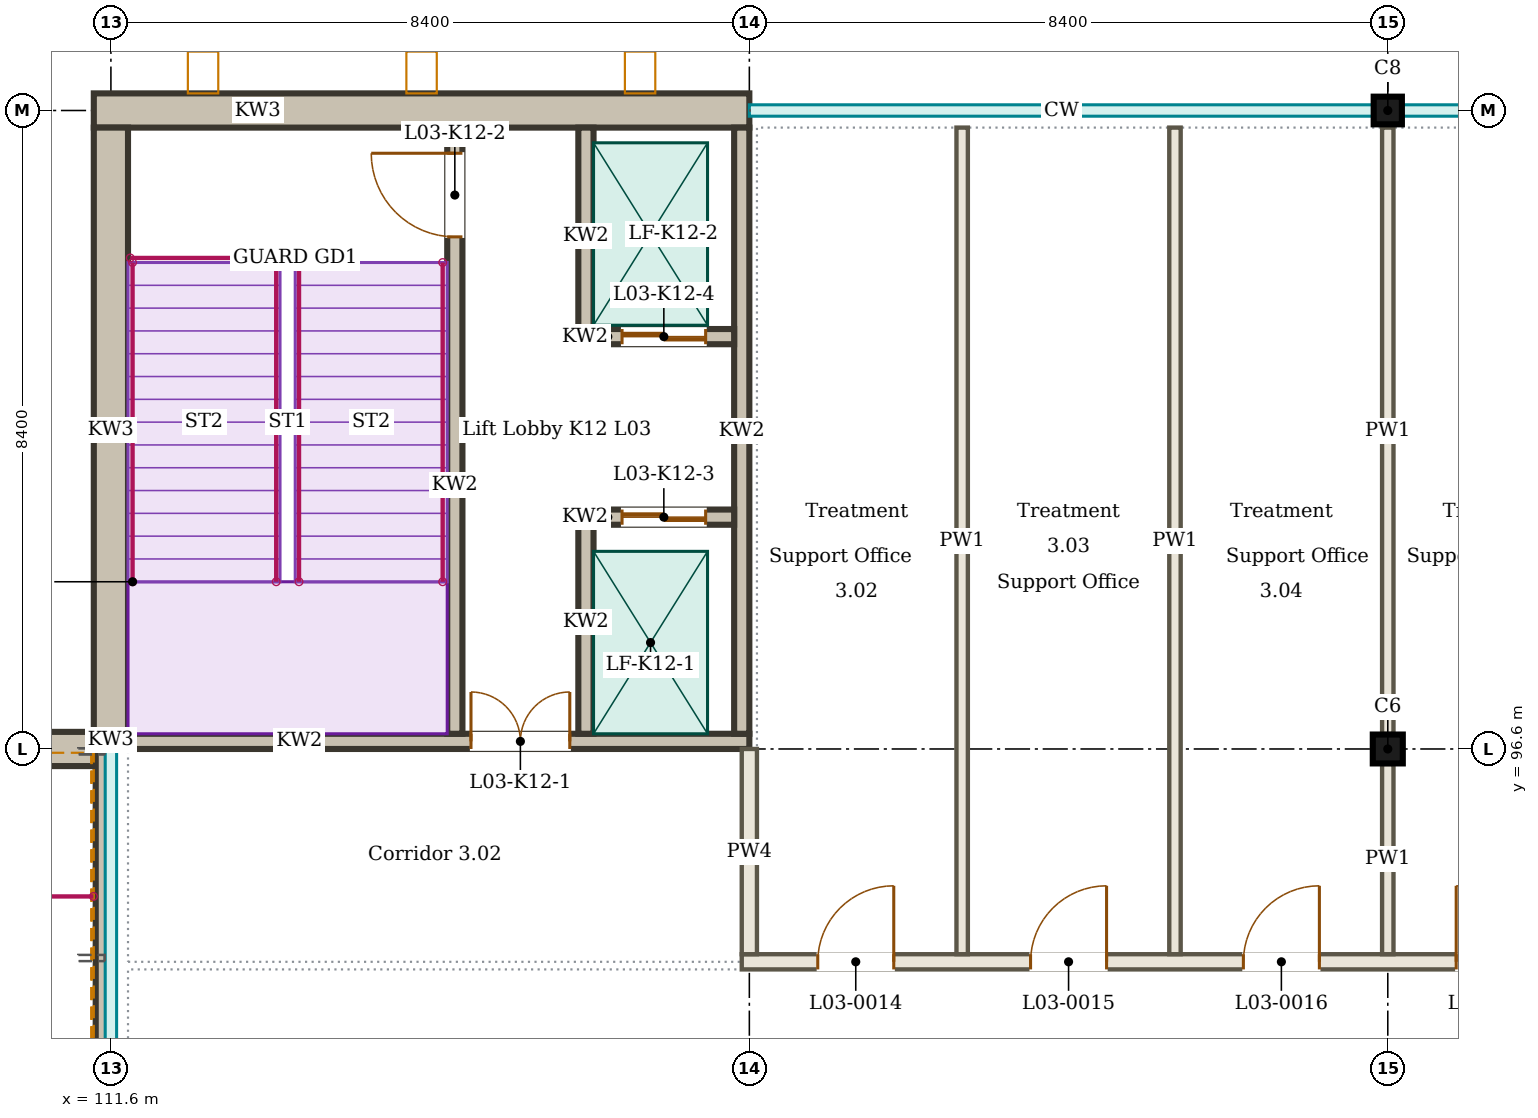
"""IFC4 building model, lengths in metres.
Left out: names, types, materials, properties, quantities, classifications, styles, units other than length and angle.
Written with IfcOpenShell. Run it as: python <this file> out.ifc"""

import sys

from ifc_helpers import new_model, si_unit, direction, frame, frame_2d, origin, origin_2d, place, context, subcontext, project, spatial, rectangle, i_section, extrude, element, fill, save


model = new_model("IFC4")
c1 = context("Model", 3, precision=1e-05, world=origin(), true_north=direction((0.0, 1.0)))
c2 = subcontext(c1, "Body", "Model", "MODEL_VIEW")
j1 = project(units=[si_unit("LENGTHUNIT", "METRE"), si_unit("PLANEANGLEUNIT", "RADIAN")], contexts=[c1])
p1 = place(None, origin())
s1 = spatial("IfcSite", under=j1, at=p1, CompositionType="ELEMENT")
p2 = place(p1, origin())
s2 = spatial("IfcBuilding", under=s1, at=p2, CompositionType="ELEMENT")
p3 = place(p2, frame((0.0, 0.0, 13.5)))
s3 = spatial("IfcBuildingStorey", under=s2, at=p3, CompositionType="ELEMENT", Elevation=13.5)
p4 = place(p3, frame((128.4, 96.6, 0.0), z_axis=(0.0, 0.0, 1.0), x_axis=(1.0, 0.0, 0.0)))
e1 = element("IfcColumn", 1, at=p4, inside=s3, PredefinedType="COLUMN", context=c2, shape_type="SweptSolid", body=[
    extrude(i_section(OverallWidth=0.395, OverallDepth=0.38, WebThickness=0.019, FlangeThickness=0.03, FilletRadius=0.027, at=origin_2d()), origin(), (0.0, 0.0, 1.0), 4.5),
])
p5 = place(p3, frame((128.4, 105.0, 0.0), z_axis=(0.0, 0.0, 1.0), x_axis=(1.0, 0.0, 0.0)))
e2 = element("IfcColumn", 2, at=p5, inside=s3, PredefinedType="COLUMN", context=c2, shape_type="SweptSolid", body=[
    extrude(i_section(OverallWidth=0.371, OverallDepth=0.364, WebThickness=0.013, FlangeThickness=0.022, FilletRadius=0.027, at=origin_2d()), origin(), (0.0, 0.0, 1.0), 4.5),
])
p6 = place(p3, frame((111.44, 88.35, 3.87), z_axis=(0.0, 0.0, 1.0), x_axis=(0.0, 1.0, 0.0)))
e3 = element("IfcWall", 3, at=p6, inside=s3, PredefinedType="SOLIDWALL", context=c2, shape_type="SweptSolid", body=[
    extrude(rectangle(XDim=8.25, YDim=0.13, at=frame_2d((4.125, 0.0))), origin(), (0.0, 0.0, 1.0), 0.63),
])
p7 = place(p3, frame((119.9, 93.8, 0.0), z_axis=(0.0, 0.0, 1.0), x_axis=(1.0, 0.0, 0.0)))
e4 = element("IfcWall", 4, at=p7, inside=s3, PredefinedType="PARTITIONING", context=c2, shape_type="SweptSolid", body=[
    extrude(rectangle(XDim=22.6, YDim=0.2, at=frame_2d((11.3, 0.0))), origin(), (0.0, 0.0, 1.0), 3.8),
])
p8 = place(p7, frame((1.0, 0.0, 0.0)))
e5 = element("IfcOpeningElement", 5, at=p8, cuts=e4, PredefinedType="OPENING", context=c2, shape_type="SweptSolid", body=[
    extrude(rectangle(XDim=1.0, YDim=2.1, at=frame_2d((0.5, 1.05))), frame((0.0, 0.11, 0.0), z_axis=(0.0, -1.0, 0.0), x_axis=(1.0, 0.0, 0.0)), (0.0, 0.0, 1.0), 0.22),
])
p9 = place(p7, frame((3.8, 0.0, 0.0)))
e6 = element("IfcOpeningElement", 6, at=p9, cuts=e4, PredefinedType="OPENING", context=c2, shape_type="SweptSolid", body=[
    extrude(rectangle(XDim=1.0, YDim=2.1, at=frame_2d((0.5, 1.05))), frame((0.0, 0.11, 0.0), z_axis=(0.0, -1.0, 0.0), x_axis=(1.0, 0.0, 0.0)), (0.0, 0.0, 1.0), 0.22),
])
p10 = place(p7, frame((6.6, 0.0, 0.0)))
e7 = element("IfcOpeningElement", 7, at=p10, cuts=e4, PredefinedType="OPENING", context=c2, shape_type="SweptSolid", body=[
    extrude(rectangle(XDim=1.0, YDim=2.1, at=frame_2d((0.5, 1.05))), frame((0.0, 0.11, 0.0), z_axis=(0.0, -1.0, 0.0), x_axis=(1.0, 0.0, 0.0)), (0.0, 0.0, 1.0), 0.22),
])
p11 = place(p7, frame((9.4, 0.0, 0.0)))
e8 = element("IfcOpeningElement", 8, at=p11, cuts=e4, PredefinedType="OPENING", context=c2, shape_type="SweptSolid", body=[
    extrude(rectangle(XDim=1.0, YDim=2.1, at=frame_2d((0.5, 1.05))), frame((0.0, 0.11, 0.0), z_axis=(0.0, -1.0, 0.0), x_axis=(1.0, 0.0, 0.0)), (0.0, 0.0, 1.0), 0.22),
])
p12 = place(p7, frame((13.6, 0.0, 0.0)))
e9 = element("IfcOpeningElement", 9, at=p12, cuts=e4, PredefinedType="OPENING", context=c2, shape_type="SweptSolid", body=[
    extrude(rectangle(XDim=1.0, YDim=2.1, at=frame_2d((0.5, 1.05))), frame((0.0, 0.11, 0.0), z_axis=(0.0, -1.0, 0.0), x_axis=(1.0, 0.0, 0.0)), (0.0, 0.0, 1.0), 0.22),
])
p13 = place(p7, frame((19.2, 0.0, 0.0)))
e10 = element("IfcOpeningElement", 10, at=p13, cuts=e4, PredefinedType="OPENING", context=c2, shape_type="SweptSolid", body=[
    extrude(rectangle(XDim=1.0, YDim=2.1, at=frame_2d((0.5, 1.05))), frame((0.0, 0.11, 0.0), z_axis=(0.0, -1.0, 0.0), x_axis=(1.0, 0.0, 0.0)), (0.0, 0.0, 1.0), 0.22),
])
p14 = place(p3, frame((120.0, 93.9, 0.0), z_axis=(0.0, 0.0, 1.0), x_axis=(0.0, 1.0, 0.0)))
e11 = element("IfcWall", 11, at=p14, inside=s3, PredefinedType="PARTITIONING", context=c2, shape_type="SweptSolid", body=[
    extrude(rectangle(XDim=2.7, YDim=0.2, at=frame_2d((1.35, 0.0))), origin(), (0.0, 0.0, 1.0), 3.8),
])
for number, where, z_axis, x_axis in (
    (12, (122.8, 93.9, 0.0), (0.0, 0.0, 1.0), (0.0, 1.0, 0.0)),
    (13, (125.6, 93.9, 0.0), (0.0, 0.0, 1.0), (0.0, 1.0, 0.0)),
):
    element("IfcWall", number, at=place(p3, frame(where, z_axis=z_axis, x_axis=x_axis)), inside=s3, PredefinedType="PARTITIONING", context=c2, shape_type="SweptSolid", body=[
        extrude(rectangle(XDim=10.875, YDim=0.15, at=frame_2d((5.438, 0.0))), origin(), (0.0, 0.0, 1.0), 3.8),
    ])
p15 = place(p3, frame((128.4, 93.9, 0.0), z_axis=(0.0, 0.0, 1.0), x_axis=(0.0, 1.0, 0.0)))
e14 = element("IfcWall", 14, at=p15, inside=s3, PredefinedType="PARTITIONING", context=c2, shape_type="SweptSolid", body=[
    extrude(rectangle(XDim=2.503, YDim=0.15, at=frame_2d((1.251, 0.0))), origin(), (0.0, 0.0, 1.0), 3.8),
])
p16 = place(p3, frame((128.4, 96.798, 0.0), z_axis=(0.0, 0.0, 1.0), x_axis=(0.0, 1.0, 0.0)))
e15 = element("IfcWall", 15, at=p16, inside=s3, PredefinedType="PARTITIONING", context=c2, shape_type="SweptSolid", body=[
    extrude(rectangle(XDim=7.977, YDim=0.15, at=frame_2d((3.989, 0.0))), origin(), (0.0, 0.0, 1.0), 3.8),
])
p17 = place(p3, frame((111.4, 96.6, 0.0), z_axis=(0.0, 0.0, 1.0), x_axis=(-1.0, 0.0, 0.0)))
e16 = element("IfcWall", 16, at=p17, inside=s3, PredefinedType="SOLIDWALL", context=c2, shape_type="SweptSolid", body=[
    extrude(rectangle(XDim=4.4, YDim=0.45, at=frame_2d((2.2, 0.0))), origin(), (0.0, 0.0, 1.0), 3.0),
])
p18 = place(p3, frame((111.5, 88.4, 0.0), z_axis=(0.0, 0.0, 1.0), x_axis=(0.0, 1.0, 0.0)))
e17 = element("IfcWall", 17, at=p18, inside=s3, PredefinedType="SOLIDWALL", context=c2, shape_type="SweptSolid", body=[
    extrude(rectangle(XDim=8.2, YDim=0.2, at=frame_2d((4.1, 0.0))), origin(), (0.0, 0.0, 1.0), 3.0),
])
p19 = place(p3, frame((111.825, 96.7, 0.0), z_axis=(0.0, 0.0, 1.0), x_axis=(1.0, 0.0, 0.0)))
e18 = element("IfcWall", 18, at=p19, inside=s3, PredefinedType="SOLIDWALL", context=c2, shape_type="SweptSolid", body=[
    extrude(rectangle(XDim=8.175, YDim=0.2, at=frame_2d((4.087, 0.0))), origin(), (0.0, 0.0, 1.0), 4.5),
])
p20 = place(p19, frame((4.512, 0.0, 0.0)))
e19 = element("IfcOpeningElement", 19, at=p20, cuts=e18, PredefinedType="OPENING", context=c2, shape_type="SweptSolid", body=[
    extrude(rectangle(XDim=1.3, YDim=2.1, at=frame_2d((0.65, 1.05))), frame((0.0, 0.11, 0.0), z_axis=(0.0, -1.0, 0.0), x_axis=(1.0, 0.0, 0.0)), (0.0, 0.0, 1.0), 0.22),
])
p21 = place(p3, frame((111.375, 105.0, 0.0), z_axis=(0.0, 0.0, 1.0), x_axis=(1.0, 0.0, 0.0)))
e20 = element("IfcWall", 20, at=p21, inside=s3, PredefinedType="SOLIDWALL", context=c2, shape_type="SweptSolid", body=[
    extrude(rectangle(XDim=8.625, YDim=0.45, at=frame_2d((4.312, 0.0))), origin(), (0.0, 0.0, 1.0), 4.5),
])
p22 = place(p3, frame((111.6, 96.825, 0.0), z_axis=(0.0, 0.0, 1.0), x_axis=(0.0, 1.0, 0.0)))
e21 = element("IfcWall", 21, at=p22, inside=s3, PredefinedType="SOLIDWALL", context=c2, shape_type="SweptSolid", body=[
    extrude(rectangle(XDim=7.95, YDim=0.45, at=frame_2d((3.975, 0.0))), origin(), (0.0, 0.0, 1.0), 4.5),
])
p23 = place(p3, frame((111.6, 96.6, 0.0), z_axis=(0.0, 0.0, 1.0), x_axis=(0.0, 1.0, 0.0)))
e22 = element("IfcWall", 22, at=p23, inside=s3, PredefinedType="SOLIDWALL", context=c2, shape_type="SweptSolid", body=[
    extrude(rectangle(XDim=0.225, YDim=0.45, at=frame_2d((0.112, 0.0))), origin(), (0.0, 0.0, 1.0), 4.5),
])
p24 = place(p3, frame((119.9, 96.8, 0.0), z_axis=(0.0, 0.0, 1.0), x_axis=(0.0, 1.0, 0.0)))
e23 = element("IfcWall", 23, at=p24, inside=s3, PredefinedType="SOLIDWALL", context=c2, shape_type="SweptSolid", body=[
    extrude(rectangle(XDim=7.975, YDim=0.2, at=frame_2d((3.987, 0.0))), origin(), (0.0, 0.0, 1.0), 4.5),
])
p25 = place(p3, frame((116.125, 96.8, 0.0), z_axis=(0.0, 0.0, 1.0), x_axis=(0.0, 1.0, 0.0)))
e24 = element("IfcWall", 24, at=p25, inside=s3, PredefinedType="SOLIDWALL", context=c2, shape_type="SweptSolid", body=[
    extrude(rectangle(XDim=7.975, YDim=0.2, at=frame_2d((3.987, 0.0))), origin(), (0.0, 0.0, 1.0), 4.5),
])
p26 = place(p25, frame((6.538, 0.0, 0.0)))
e25 = element("IfcOpeningElement", 25, at=p26, cuts=e24, PredefinedType="OPENING", context=c2, shape_type="SweptSolid", body=[
    extrude(rectangle(XDim=1.1, YDim=2.1, at=frame_2d((0.55, 1.05))), frame((0.0, 0.11, 0.0), z_axis=(0.0, -1.0, 0.0), x_axis=(1.0, 0.0, 0.0)), (0.0, 0.0, 1.0), 0.22),
])
p27 = place(p3, frame((117.85, 96.8, 0.0), z_axis=(0.0, 0.0, 1.0), x_axis=(0.0, 1.0, 0.0)))
e26 = element("IfcWall", 26, at=p27, inside=s3, PredefinedType="SOLIDWALL", context=c2, shape_type="SweptSolid", body=[
    extrude(rectangle(XDim=2.95, YDim=0.2, at=frame_2d((1.475, 0.0))), origin(), (0.0, 0.0, 1.0), 4.5),
])
p28 = place(p3, frame((117.85, 101.925, 0.0), z_axis=(0.0, 0.0, 1.0), x_axis=(0.0, 1.0, 0.0)))
e27 = element("IfcWall", 27, at=p28, inside=s3, PredefinedType="SOLIDWALL", context=c2, shape_type="SweptSolid", body=[
    extrude(rectangle(XDim=2.85, YDim=0.2, at=frame_2d((1.425, 0.0))), origin(), (0.0, 0.0, 1.0), 4.5),
])
p29 = place(p3, frame((117.95, 99.65, 0.0), z_axis=(0.0, 0.0, 1.0), x_axis=(1.0, 0.0, 0.0)))
e28 = element("IfcWall", 28, at=p29, inside=s3, PredefinedType="SOLIDWALL", context=c2, shape_type="SweptSolid", body=[
    extrude(rectangle(XDim=1.85, YDim=0.2, at=frame_2d((0.925, 0.0))), origin(), (0.0, 0.0, 1.0), 4.5),
])
p30 = place(p29, frame((0.375, 0.0, 0.0)))
e29 = element("IfcOpeningElement", 29, at=p30, cuts=e28, PredefinedType="OPENING", context=c2, shape_type="SweptSolid", body=[
    extrude(rectangle(XDim=1.1, YDim=2.1, at=frame_2d((0.55, 1.05))), frame((0.0, 0.11, 0.0), z_axis=(0.0, -1.0, 0.0), x_axis=(1.0, 0.0, 0.0)), (0.0, 0.0, 1.0), 0.22),
])
p31 = place(p3, frame((117.95, 102.025, 0.0), z_axis=(0.0, 0.0, 1.0), x_axis=(1.0, 0.0, 0.0)))
e30 = element("IfcWall", 30, at=p31, inside=s3, PredefinedType="SOLIDWALL", context=c2, shape_type="SweptSolid", body=[
    extrude(rectangle(XDim=1.85, YDim=0.2, at=frame_2d((0.925, 0.0))), origin(), (0.0, 0.0, 1.0), 4.5),
])
p32 = place(p31, frame((0.375, 0.0, 0.0)))
e31 = element("IfcOpeningElement", 31, at=p32, cuts=e30, PredefinedType="OPENING", context=c2, shape_type="SweptSolid", body=[
    extrude(rectangle(XDim=1.1, YDim=2.1, at=frame_2d((0.55, 1.05))), frame((0.0, 0.11, 0.0), z_axis=(0.0, -1.0, 0.0), x_axis=(1.0, 0.0, 0.0)), (0.0, 0.0, 1.0), 0.22),
])
p33 = place(p8, origin())
e32 = element("IfcDoor", 32, at=p33, inside=s3, OperationType="SINGLE_SWING_RIGHT", PredefinedType="DOOR", context=c2, shape_type="SweptSolid", body=[
    extrude(rectangle(XDim=1.0, YDim=2.1, at=frame_2d((0.5, 1.05))), frame((0.0, 0.025, 0.0), z_axis=(0.0, -1.0, 0.0), x_axis=(1.0, 0.0, 0.0)), (0.0, 0.0, 1.0), 0.05),
])
fill(e5, e32)
p34 = place(p9, origin())
e33 = element("IfcDoor", 33, at=p34, inside=s3, OperationType="SINGLE_SWING_RIGHT", PredefinedType="DOOR", context=c2, shape_type="SweptSolid", body=[
    extrude(rectangle(XDim=1.0, YDim=2.1, at=frame_2d((0.5, 1.05))), frame((0.0, 0.025, 0.0), z_axis=(0.0, -1.0, 0.0), x_axis=(1.0, 0.0, 0.0)), (0.0, 0.0, 1.0), 0.05),
])
fill(e6, e33)
p35 = place(p10, origin())
e34 = element("IfcDoor", 34, at=p35, inside=s3, OperationType="SINGLE_SWING_RIGHT", PredefinedType="DOOR", context=c2, shape_type="SweptSolid", body=[
    extrude(rectangle(XDim=1.0, YDim=2.1, at=frame_2d((0.5, 1.05))), frame((0.0, 0.025, 0.0), z_axis=(0.0, -1.0, 0.0), x_axis=(1.0, 0.0, 0.0)), (0.0, 0.0, 1.0), 0.05),
])
fill(e7, e34)
p36 = place(p11, origin())
e35 = element("IfcDoor", 35, at=p36, inside=s3, OperationType="SINGLE_SWING_LEFT", PredefinedType="DOOR", context=c2, shape_type="SweptSolid", body=[
    extrude(rectangle(XDim=1.0, YDim=2.1, at=frame_2d((0.5, 1.05))), frame((0.0, 0.025, 0.0), z_axis=(0.0, -1.0, 0.0), x_axis=(1.0, 0.0, 0.0)), (0.0, 0.0, 1.0), 0.05),
])
fill(e8, e35)
p37 = place(p20, origin())
e36 = element("IfcDoor", 36, at=p37, inside=s3, OperationType="DOUBLE_DOOR_DOUBLE_SWING", PredefinedType="DOOR", context=c2, shape_type="SweptSolid", body=[
    extrude(rectangle(XDim=1.3, YDim=2.1, at=frame_2d((0.65, 1.05))), frame((0.0, 0.025, 0.0), z_axis=(0.0, -1.0, 0.0), x_axis=(1.0, 0.0, 0.0)), (0.0, 0.0, 1.0), 0.05),
])
fill(e19, e36)
p38 = place(p26, origin())
e37 = element("IfcDoor", 37, at=p38, inside=s3, OperationType="SINGLE_SWING_RIGHT", PredefinedType="DOOR", context=c2, shape_type="SweptSolid", body=[
    extrude(rectangle(XDim=1.1, YDim=2.1, at=frame_2d((0.55, 1.05))), frame((0.0, 0.025, 0.0), z_axis=(0.0, -1.0, 0.0), x_axis=(1.0, 0.0, 0.0)), (0.0, 0.0, 1.0), 0.05),
])
fill(e25, e37)
p39 = place(p30, origin())
e38 = element("IfcDoor", 38, at=p39, inside=s3, OperationType="DOUBLE_DOOR_SLIDING", PredefinedType="DOOR", context=c2, shape_type="SweptSolid", body=[
    extrude(rectangle(XDim=1.1, YDim=2.1, at=frame_2d((0.55, 1.05))), frame((0.0, 0.025, 0.0), z_axis=(0.0, -1.0, 0.0), x_axis=(1.0, 0.0, 0.0)), (0.0, 0.0, 1.0), 0.05),
])
fill(e29, e38)
p40 = place(p32, origin())
e39 = element("IfcDoor", 39, at=p40, inside=s3, OperationType="DOUBLE_DOOR_SLIDING", PredefinedType="DOOR", context=c2, shape_type="SweptSolid", body=[
    extrude(rectangle(XDim=1.1, YDim=2.1, at=frame_2d((0.55, 1.05))), frame((0.0, 0.025, 0.0), z_axis=(0.0, -1.0, 0.0), x_axis=(1.0, 0.0, 0.0)), (0.0, 0.0, 1.0), 0.05),
])
fill(e31, e39)
save(model, sys.argv[1])
